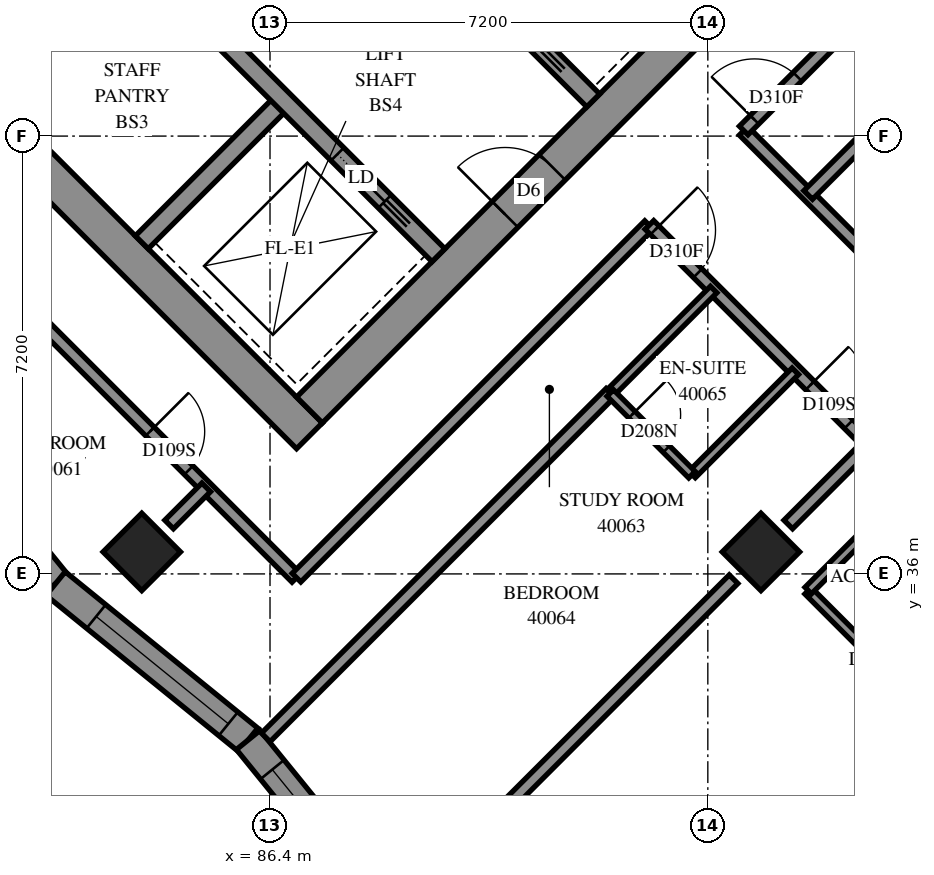
"""IFC4 building model, lengths in metres.
Left out: names, types, materials, properties, quantities, classifications, styles, units other than length and angle.
Written with IfcOpenShell. Run it as: python <this file> out.ifc"""

import sys

from ifc_helpers import new_model, si_unit, direction, frame, frame_2d, origin, origin_2d, place, context, subcontext, project, spatial, polyline, rectangle, outline, extrude, element, fill, save


model = new_model("IFC4")
c1 = context("Model", 3, precision=1e-05, world=origin(), true_north=direction((0.0, 1.0)))
c2 = subcontext(c1, "Body", "Model", "MODEL_VIEW")
j1 = project(units=[si_unit("LENGTHUNIT", "METRE"), si_unit("PLANEANGLEUNIT", "RADIAN")], contexts=[c1])
p1 = place(None, origin())
s1 = spatial("IfcSite", under=j1, at=p1, CompositionType="ELEMENT")
p2 = place(p1, origin())
s2 = spatial("IfcBuilding", under=s1, at=p2, CompositionType="ELEMENT")
p3 = place(p2, frame((0.0, 0.0, 149.0)))
s3 = spatial("IfcBuildingStorey", under=s2, at=p3, CompositionType="ELEMENT", Elevation=149.0)
for number, where, z_axis, x_axis in (
    (1, (84.291, 36.362, 0.0), (0.0, 0.0, 1.0), (0.707, -0.707, 0.0)),
    (2, (94.474, 36.362, 0.0), (0.0, 0.0, 1.0), (0.707, -0.707, 0.0)),
):
    element("IfcColumn", number, at=place(p3, frame(where, z_axis=z_axis, x_axis=x_axis)), inside=s3, PredefinedType="COLUMN", context=c2, shape_type="SweptSolid", body=[
        extrude(rectangle(XDim=0.9, YDim=0.9, at=origin_2d()), origin(), (0.0, 0.0, 1.0), 3.1),
    ])
p4 = place(p3, frame((76.018, 49.302, -0.3), z_axis=(0.0, 0.0, 1.0), x_axis=(0.7071067812, -0.7071067812, 0.0)))
e3 = element("IfcWall", 3, at=p4, inside=s3, PredefinedType="SHEAR", context=c2, shape_type="SweptSolid", body=[
    extrude(rectangle(XDim=15.6, YDim=0.6, at=frame_2d((7.8, 0.0))), origin(), (0.0, 0.0, 1.0), 2.7),
])
p5 = place(p3, frame((87.049, 38.695, -0.3), z_axis=(0.0, 0.0, 1.0), x_axis=(0.7071067812, 0.7071067812, 0.0)))
e4 = element("IfcWall", 4, at=p5, inside=s3, PredefinedType="SHEAR", context=c2, shape_type="SweptSolid", body=[
    extrude(rectangle(XDim=14.4, YDim=0.6, at=frame_2d((7.2, 0.0))), origin(), (0.0, 0.0, 1.0), 2.7),
])
p6 = place(p5, frame((4.55, 0.0, 0.3)))
e5 = element("IfcOpeningElement", 5, at=p6, cuts=e4, PredefinedType="OPENING", context=c2, shape_type="SweptSolid", body=[
    extrude(rectangle(XDim=1.1, YDim=2.1, at=frame_2d((0.55, 1.05))), frame((0.0, 0.31, 0.0), z_axis=(0.0, -1.0, 0.0), x_axis=(1.0, 0.0, 0.0)), (0.0, 0.0, 1.0), 0.62),
])
p7 = place(p5, frame((11.35, 0.0, 0.3)))
e6 = element("IfcOpeningElement", 6, at=p7, cuts=e4, PredefinedType="OPENING", context=c2, shape_type="SweptSolid", body=[
    extrude(rectangle(XDim=1.1, YDim=2.1, at=frame_2d((0.55, 1.05))), frame((0.0, 0.31, 0.0), z_axis=(0.0, -1.0, 0.0), x_axis=(1.0, 0.0, 0.0)), (0.0, 0.0, 1.0), 0.62),
])
for number, where, z_axis, x_axis in (
    (7, (81.746, 43.999, 0.0), (0.0, 0.0, 1.0), (0.707, 0.707, 0.0)),
    (8, (84.291, 41.453, 0.0), (0.0, 0.0, 1.0), (0.707, 0.707, 0.0)),
):
    element("IfcWall", number, at=place(p3, frame(where, z_axis=z_axis, x_axis=x_axis)), inside=s3, PredefinedType="SOLIDWALL", context=c2, shape_type="SweptSolid", body=[
        extrude(rectangle(XDim=3.3, YDim=0.3, at=frame_2d((1.65, 0.0))), origin(), (0.0, 0.0, 1.0), 3.1),
    ])
p8 = place(p3, frame((78.988, 51.423, 0.0), z_axis=(0.0, 0.0, 1.0), x_axis=(0.7071067812, -0.7071067812, 0.0)))
e9 = element("IfcWall", 9, at=p8, inside=s3, PredefinedType="SOLIDWALL", context=c2, shape_type="SweptSolid", body=[
    extrude(rectangle(XDim=14.4, YDim=0.3, at=frame_2d((7.2, 0.0))), origin(), (0.0, 0.0, 1.0), 3.1),
])
p9 = place(p8, frame((1.35, 0.0, 0.0)))
e10 = element("IfcOpeningElement", 10, at=p9, cuts=e9, PredefinedType="OPENING", context=c2, shape_type="SweptSolid", body=[
    extrude(rectangle(XDim=0.9, YDim=2.1, at=frame_2d((0.45, 1.05))), frame((0.0, 0.16, 0.0), z_axis=(0.0, -1.0, 0.0), x_axis=(1.0, 0.0, 0.0)), (0.0, 0.0, 1.0), 0.32),
])
p10 = place(p8, frame((4.95, 0.0, 0.0)))
e11 = element("IfcOpeningElement", 11, at=p10, cuts=e9, PredefinedType="OPENING", context=c2, shape_type="SweptSolid", body=[
    extrude(rectangle(XDim=0.9, YDim=2.1, at=frame_2d((0.45, 1.05))), frame((0.0, 0.16, 0.0), z_axis=(0.0, -1.0, 0.0), x_axis=(1.0, 0.0, 0.0)), (0.0, 0.0, 1.0), 0.32),
])
p11 = place(p8, frame((8.55, 0.0, 0.0)))
e12 = element("IfcOpeningElement", 12, at=p11, cuts=e9, PredefinedType="OPENING", context=c2, shape_type="SweptSolid", body=[
    extrude(rectangle(XDim=0.9, YDim=2.1, at=frame_2d((0.45, 1.05))), frame((0.0, 0.16, 0.0), z_axis=(0.0, -1.0, 0.0), x_axis=(1.0, 0.0, 0.0)), (0.0, 0.0, 1.0), 0.32),
])
p12 = place(p8, frame((12.05, 0.0, 0.0)))
e13 = element("IfcOpeningElement", 13, at=p12, cuts=e9, PredefinedType="OPENING", context=c2, shape_type="SweptSolid", body=[
    extrude(rectangle(XDim=1.1, YDim=2.1, at=frame_2d((0.55, 1.05))), frame((0.0, 0.16, 0.0), z_axis=(0.0, -1.0, 0.0), x_axis=(1.0, 0.0, 0.0)), (0.0, 0.0, 1.0), 0.32),
])
p13 = place(p3, frame((81.534, 53.969, 0.0), z_axis=(0.0, 0.0, 1.0), x_axis=(0.707103309, -0.7071102534, 0.0)))
e14 = element("IfcWall", 14, at=p13, inside=s3, PredefinedType="SOLIDWALL", context=c2, shape_type="SweptSolid", body=[
    extrude(rectangle(XDim=14.4, YDim=0.3, at=frame_2d((7.2, 0.0))), origin(), (0.0, 0.0, 1.0), 3.1),
])
p14 = place(p13, frame((1.25, 0.0, 0.0)))
e15 = element("IfcOpeningElement", 15, at=p14, cuts=e14, PredefinedType="OPENING", context=c2, shape_type="SweptSolid", body=[
    extrude(rectangle(XDim=1.1, YDim=2.1, at=frame_2d((0.55, 1.05))), frame((0.0, 0.16, 0.0), z_axis=(0.0, -1.0, 0.0), x_axis=(1.0, 0.0, 0.0)), (0.0, 0.0, 1.0), 0.32),
])
p15 = place(p13, frame((4.85, 0.0, 0.0)))
e16 = element("IfcOpeningElement", 16, at=p15, cuts=e14, PredefinedType="OPENING", context=c2, shape_type="SweptSolid", body=[
    extrude(rectangle(XDim=1.1, YDim=2.1, at=frame_2d((0.55, 1.05))), frame((0.0, 0.16, 0.0), z_axis=(0.0, -1.0, 0.0), x_axis=(1.0, 0.0, 0.0)), (0.0, 0.0, 1.0), 0.32),
])
p16 = place(p13, frame((8.45, 0.0, 0.0)))
e17 = element("IfcOpeningElement", 17, at=p16, cuts=e14, PredefinedType="OPENING", context=c2, shape_type="SweptSolid", body=[
    extrude(rectangle(XDim=1.1, YDim=2.1, at=frame_2d((0.55, 1.05))), frame((0.0, 0.16, 0.0), z_axis=(0.0, -1.0, 0.0), x_axis=(1.0, 0.0, 0.0)), (0.0, 0.0, 1.0), 0.32),
])
p17 = place(p13, frame((12.05, 0.0, 0.0)))
e18 = element("IfcOpeningElement", 18, at=p17, cuts=e14, PredefinedType="OPENING", context=c2, shape_type="SweptSolid", body=[
    extrude(rectangle(XDim=1.1, YDim=2.1, at=frame_2d((0.55, 1.05))), frame((0.0, 0.16, 0.0), z_axis=(0.0, -1.0, 0.0), x_axis=(1.0, 0.0, 0.0)), (0.0, 0.0, 1.0), 0.32),
])
p18 = place(p3, frame((80.291, 39.023, 0.0), z_axis=(0.0, 0.0, 1.0), x_axis=(0.6303794952, -0.7762871195, 0.0)))
e19 = element("IfcWall", 19, at=p18, inside=s3, PredefinedType="SOLIDWALL", context=c2, shape_type="SweptSolid", body=[
    extrude(outline(polyline([(0.044, -0.25), (4.124, -0.25), (4.072, 0.25), (-0.044, 0.25), (0.044, -0.25)])), origin(), (0.0, 0.0, 1.0), 3.1),
])
p19 = place(p18, frame((1.894, 0.0, 0.45)))
e20 = element("IfcOpeningElement", 20, at=p19, cuts=e19, PredefinedType="OPENING", context=c2, shape_type="SweptSolid", body=[
    extrude(rectangle(XDim=1.2, YDim=2.5, at=frame_2d((0.6, 1.25))), frame((0.0, 0.26, 0.0), z_axis=(0.0, -1.0, 0.0), x_axis=(1.0, 0.0, 0.0)), (0.0, 0.0, 1.0), 0.52),
])
p20 = place(p3, frame((82.874, 35.842, 0.0), z_axis=(0.0, 0.0, 1.0), x_axis=(0.7762833982, -0.6303840779, 0.0)))
e21 = element("IfcWall", 21, at=p20, inside=s3, PredefinedType="SOLIDWALL", context=c2, shape_type="SweptSolid", body=[
    extrude(outline(polyline([(-0.026, -0.25), (4.054, -0.25), (4.106, 0.25), (0.026, 0.25), (-0.026, -0.25)])), origin(), (0.0, 0.0, 1.0), 3.1),
])
p21 = place(p20, frame((0.859, 0.0, 0.45)))
e22 = element("IfcOpeningElement", 22, at=p21, cuts=e21, PredefinedType="OPENING", context=c2, shape_type="SweptSolid", body=[
    extrude(rectangle(XDim=2.8, YDim=2.5, at=frame_2d((1.4, 1.25))), frame((0.0, 0.26, 0.0), z_axis=(0.0, -1.0, 0.0), x_axis=(1.0, 0.0, 0.0)), (0.0, 0.0, 1.0), 0.52),
])
p22 = place(p3, frame((86.042, 33.269, 0.0), z_axis=(0.0, 0.0, 1.0), x_axis=(0.6303840779, -0.7762833982, 0.0)))
e23 = element("IfcWall", 23, at=p22, inside=s3, PredefinedType="SOLIDWALL", context=c2, shape_type="SweptSolid", body=[
    extrude(outline(polyline([(0.026, -0.25), (4.106, -0.25), (4.054, 0.25), (-0.026, 0.25), (0.026, -0.25)])), origin(), (0.0, 0.0, 1.0), 3.1),
])
p23 = place(p22, frame((0.627, 0.0, 0.45)))
e24 = element("IfcOpeningElement", 24, at=p23, cuts=e23, PredefinedType="OPENING", context=c2, shape_type="SweptSolid", body=[
    extrude(rectangle(XDim=2.8, YDim=2.5, at=frame_2d((1.4, 1.25))), frame((0.0, 0.26, 0.0), z_axis=(0.0, -1.0, 0.0), x_axis=(1.0, 0.0, 0.0)), (0.0, 0.0, 1.0), 0.52),
])
p24 = place(p3, frame((94.189, 43.287, 0.0), z_axis=(0.0, 0.0, 1.0), x_axis=(0.7071067812, -0.7071067812, 0.0)))
e25 = element("IfcWall", 25, at=p24, inside=s3, PredefinedType="PARTITIONING", context=c2, shape_type="SweptSolid", body=[
    extrude(rectangle(XDim=12.298, YDim=0.2, at=frame_2d((6.149, 0.0))), origin(), (0.0, 0.0, 1.0), 3.1),
])
p25 = place(p24, frame((3.755, 0.0, 0.0)))
e26 = element("IfcOpeningElement", 26, at=p25, cuts=e25, PredefinedType="OPENING", context=c2, shape_type="SweptSolid", body=[
    extrude(rectangle(XDim=0.9, YDim=2.1, at=frame_2d((0.45, 1.05))), frame((0.0, 0.11, 0.0), z_axis=(0.0, -1.0, 0.0), x_axis=(1.0, 0.0, 0.0)), (0.0, 0.0, 1.0), 0.22),
])
p26 = place(p24, frame((10.998, 0.0, 0.0)))
e27 = element("IfcOpeningElement", 27, at=p26, cuts=e25, PredefinedType="OPENING", context=c2, shape_type="SweptSolid", body=[
    extrude(rectangle(XDim=0.9, YDim=2.1, at=frame_2d((0.45, 1.05))), frame((0.0, 0.11, 0.0), z_axis=(0.0, -1.0, 0.0), x_axis=(1.0, 0.0, 0.0)), (0.0, 0.0, 1.0), 0.22),
])
p27 = place(p3, frame((95.25, 42.232, 0.0), z_axis=(0.0, 0.0, 1.0), x_axis=(0.7071114274, 0.7071021349, 0.0)))
e28 = element("IfcWall", 28, at=p27, inside=s3, PredefinedType="PARTITIONING", context=c2, shape_type="SweptSolid", body=[
    extrude(rectangle(XDim=10.761, YDim=0.2, at=frame_2d((5.381, 0.0))), origin(), (0.0, 0.0, 1.0), 3.1),
])
p28 = place(p3, frame((80.899, 41.869, 0.0), z_axis=(0.0, 0.0, 1.0), x_axis=(0.7071067812, -0.7071067812, 0.0)))
e29 = element("IfcWall", 29, at=p28, inside=s3, PredefinedType="PARTITIONING", context=c2, shape_type="SweptSolid", body=[
    extrude(rectangle(XDim=8.392, YDim=0.2, at=frame_2d((4.196, 0.0))), origin(), (0.0, 0.0, 1.0), 3.1),
])
p29 = place(p28, frame((4.988, 0.0, 0.0)))
e30 = element("IfcOpeningElement", 30, at=p29, cuts=e29, PredefinedType="OPENING", context=c2, shape_type="SweptSolid", body=[
    extrude(rectangle(XDim=0.9, YDim=2.1, at=frame_2d((0.45, 1.05))), frame((0.0, 0.11, 0.0), z_axis=(0.0, -1.0, 0.0), x_axis=(1.0, 0.0, 0.0)), (0.0, 0.0, 1.0), 0.22),
])
p30 = place(p3, frame((94.19, 43.292, 0.0), z_axis=(0.0, 0.0, 1.0), x_axis=(0.7071067812, 0.7071067812, 0.0)))
e31 = element("IfcWall", 31, at=p30, inside=s3, PredefinedType="PARTITIONING", context=c2, shape_type="SweptSolid", body=[
    extrude(rectangle(XDim=8.2, YDim=0.2, at=frame_2d((4.1, 0.0))), origin(), (0.0, 0.0, 1.0), 3.1),
])
p31 = place(p30, frame((0.251, 0.0, 0.0)))
e32 = element("IfcOpeningElement", 32, at=p31, cuts=e31, PredefinedType="OPENING", context=c2, shape_type="SweptSolid", body=[
    extrude(rectangle(XDim=1.0, YDim=2.1, at=frame_2d((0.5, 1.05))), frame((0.0, 0.11, 0.0), z_axis=(0.0, -1.0, 0.0), x_axis=(1.0, 0.0, 0.0)), (0.0, 0.0, 1.0), 0.22),
])
p32 = place(p3, frame((86.836, 35.938, 0.0), z_axis=(0.0, 0.0, 1.0), x_axis=(0.7071067812, 0.7071067812, 0.0)))
e33 = element("IfcWall", 33, at=p32, inside=s3, PredefinedType="PARTITIONING", context=c2, shape_type="SweptSolid", body=[
    extrude(rectangle(XDim=8.2, YDim=0.2, at=frame_2d((4.1, 0.0))), origin(), (0.0, 0.0, 1.0), 3.1),
])
p33 = place(p3, frame((86.33, 33.311, 0.0), z_axis=(0.0, 0.0, 1.0), x_axis=(0.7071005427, 0.7071130196, 0.0)))
e34 = element("IfcWall", 34, at=p33, inside=s3, PredefinedType="PARTITIONING", context=c2, shape_type="SweptSolid", body=[
    extrude(rectangle(XDim=8.015, YDim=0.2, at=frame_2d((4.007, 0.0))), origin(), (0.0, 0.0, 1.0), 3.1),
])
p34 = place(p3, frame((89.831, 31.721, 0.0), z_axis=(0.0, 0.0, 1.0), x_axis=(0.7071067812, 0.7071067812, 0.0)))
e35 = element("IfcWall", 35, at=p34, inside=s3, PredefinedType="PARTITIONING", context=c2, shape_type="SweptSolid", body=[
    extrude(rectangle(XDim=5.928, YDim=0.2, at=frame_2d((2.964, 0.0))), origin(), (0.0, 0.0, 1.0), 3.1),
])
p35 = place(p3, frame((92.639, 41.739, 0.0), z_axis=(0.0, 0.0, 1.0), x_axis=(0.7071067812, -0.7071067812, 0.0)))
e36 = element("IfcWall", 36, at=p35, inside=s3, PredefinedType="PARTITIONING", context=c2, shape_type="SweptSolid", body=[
    extrude(rectangle(XDim=5.1, YDim=0.2, at=frame_2d((2.55, 0.0))), origin(), (0.0, 0.0, 1.0), 3.1),
])
p36 = place(p35, frame((0.123, 0.0, 0.0)))
e37 = element("IfcOpeningElement", 37, at=p36, cuts=e36, PredefinedType="OPENING", context=c2, shape_type="SweptSolid", body=[
    extrude(rectangle(XDim=1.0, YDim=2.1, at=frame_2d((0.5, 1.05))), frame((0.0, 0.11, 0.0), z_axis=(0.0, -1.0, 0.0), x_axis=(1.0, 0.0, 0.0)), (0.0, 0.0, 1.0), 0.22),
])
p37 = place(p35, frame((3.734, 0.0, 0.0)))
e38 = element("IfcOpeningElement", 38, at=p37, cuts=e36, PredefinedType="OPENING", context=c2, shape_type="SweptSolid", body=[
    extrude(rectangle(XDim=0.9, YDim=2.1, at=frame_2d((0.45, 1.05))), frame((0.0, 0.11, 0.0), z_axis=(0.0, -1.0, 0.0), x_axis=(1.0, 0.0, 0.0)), (0.0, 0.0, 1.0), 0.22),
])
p38 = place(p3, frame((95.249, 35.723, 0.0), z_axis=(0.0, 0.0, 1.0), x_axis=(0.7067942478, -0.7074191764, 0.0)))
e39 = element("IfcWall", 39, at=p38, inside=s3, PredefinedType="PARTITIONING", context=c2, shape_type="SweptSolid", body=[
    extrude(rectangle(XDim=3.2, YDim=0.15, at=frame_2d((1.6, 0.0))), origin(), (0.0, 0.0, 1.0), 3.1),
])
p39 = place(p38, frame((1.206, 0.0, 0.0)))
e40 = element("IfcOpeningElement", 40, at=p39, cuts=e39, PredefinedType="OPENING", context=c2, shape_type="SweptSolid", body=[
    extrude(rectangle(XDim=0.8, YDim=2.1, at=frame_2d((0.4, 1.05))), frame((0.0, 0.085, 0.0), z_axis=(0.0, -1.0, 0.0), x_axis=(1.0, 0.0, 0.0)), (0.0, 0.0, 1.0), 0.17),
])
for number, where, z_axis, x_axis in (
    (41, (93.341, 37.635, 0.0), (0.0, 0.0, 1.0), (0.707, 0.707, 0.0)),
    (42, (91.997, 38.979, 0.0), (0.0, 0.0, 1.0), (0.707, 0.707, 0.0)),
):
    element("IfcWall", number, at=place(p3, frame(where, z_axis=z_axis, x_axis=x_axis)), inside=s3, PredefinedType="PARTITIONING", context=c2, shape_type="SweptSolid", body=[
        extrude(rectangle(XDim=2.401, YDim=0.15, at=frame_2d((1.201, 0.0))), origin(), (0.0, 0.0, 1.0), 3.1),
    ])
p40 = place(p3, frame((95.251, 35.727, 0.0), z_axis=(0.0, 0.0, 1.0), x_axis=(0.7071067812, 0.7071067812, 0.0)))
e43 = element("IfcWall", 43, at=p40, inside=s3, PredefinedType="PARTITIONING", context=c2, shape_type="SweptSolid", body=[
    extrude(rectangle(XDim=2.398, YDim=0.15, at=frame_2d((1.199, 0.0))), origin(), (0.0, 0.0, 1.0), 3.1),
])
p41 = place(p3, frame((91.995, 38.975, 0.0), z_axis=(0.0, 0.0, 1.0), x_axis=(0.7071067812, -0.7071067812, 0.0)))
e44 = element("IfcWall", 44, at=p41, inside=s3, PredefinedType="PARTITIONING", context=c2, shape_type="SweptSolid", body=[
    extrude(rectangle(XDim=1.901, YDim=0.15, at=frame_2d((0.95, 0.0))), origin(), (0.0, 0.0, 1.0), 3.1),
])
p42 = place(p41, frame((0.506, 0.0, 0.0)))
e45 = element("IfcOpeningElement", 45, at=p42, cuts=e44, PredefinedType="OPENING", context=c2, shape_type="SweptSolid", body=[
    extrude(rectangle(XDim=0.8, YDim=2.1, at=frame_2d((0.4, 1.05))), frame((0.0, 0.085, 0.0), z_axis=(0.0, -1.0, 0.0), x_axis=(1.0, 0.0, 0.0)), (0.0, 0.0, 1.0), 0.17),
])
p43 = place(p3, frame((94.923, 36.813, 0.0), z_axis=(0.0, 0.0, 1.0), x_axis=(0.7071067812, 0.7071067812, 0.0)))
e46 = element("IfcWall", 46, at=p43, inside=s3, PredefinedType="PARTITIONING", context=c2, shape_type="SweptSolid", body=[
    extrude(rectangle(XDim=1.864, YDim=0.2, at=frame_2d((0.932, 0.0))), origin(), (0.0, 0.0, 1.0), 3.1),
])
p44 = place(p3, frame((84.741, 36.813, 0.0), z_axis=(0.0, 0.0, 1.0), x_axis=(0.7071067812, 0.7071067812, 0.0)))
e47 = element("IfcWall", 47, at=p44, inside=s3, PredefinedType="PARTITIONING", context=c2, shape_type="SweptSolid", body=[
    extrude(rectangle(XDim=0.863, YDim=0.2, at=frame_2d((0.431, 0.0))), origin(), (0.0, 0.0, 1.0), 3.1),
])
p45 = place(p21, origin())
e48 = element("IfcWindow", 48, at=p45, inside=s3, PartitioningType="SINGLE_PANEL", PredefinedType="WINDOW", context=c2, shape_type="SweptSolid", body=[
    extrude(rectangle(XDim=2.8, YDim=2.5, at=frame_2d((1.4, 1.25))), frame((0.0, 0.18, 0.0), z_axis=(0.0, -1.0, 0.0), x_axis=(1.0, 0.0, 0.0)), (0.0, 0.0, 1.0), 0.06),
])
fill(e22, e48)
p46 = place(p23, origin())
e49 = element("IfcWindow", 49, at=p46, inside=s3, PartitioningType="SINGLE_PANEL", PredefinedType="WINDOW", context=c2, shape_type="SweptSolid", body=[
    extrude(rectangle(XDim=2.8, YDim=2.5, at=frame_2d((1.4, 1.25))), frame((0.0, 0.18, 0.0), z_axis=(0.0, -1.0, 0.0), x_axis=(1.0, 0.0, 0.0)), (0.0, 0.0, 1.0), 0.06),
])
fill(e24, e49)
p47 = place(p6, origin())
e50 = element("IfcDoor", 50, at=p47, inside=s3, OperationType="DOUBLE_DOOR_SINGLE_SWING", PredefinedType="DOOR", context=c2, shape_type="SweptSolid", body=[
    extrude(rectangle(XDim=1.1, YDim=2.1, at=frame_2d((0.55, 1.05))), frame((0.0, 0.025, 0.0), z_axis=(0.0, -1.0, 0.0), x_axis=(1.0, 0.0, 0.0)), (0.0, 0.0, 1.0), 0.05),
])
fill(e5, e50)
p48 = place(p12, origin())
e51 = element("IfcDoor", 51, at=p48, inside=s3, OperationType="SLIDING_TO_RIGHT", PredefinedType="DOOR", context=c2, shape_type="SweptSolid", body=[
    extrude(rectangle(XDim=1.1, YDim=2.1, at=frame_2d((0.55, 1.05))), frame((0.0, 0.025, 0.0), z_axis=(0.0, -1.0, 0.0), x_axis=(1.0, 0.0, 0.0)), (0.0, 0.0, 1.0), 0.05),
])
fill(e13, e51)
p49 = place(p31, origin())
e52 = element("IfcDoor", 52, at=p49, inside=s3, OperationType="SINGLE_SWING_RIGHT", PredefinedType="DOOR", context=c2, shape_type="SweptSolid", body=[
    extrude(rectangle(XDim=1.0, YDim=2.1, at=frame_2d((0.5, 1.05))), frame((0.0, 0.025, 0.0), z_axis=(0.0, -1.0, 0.0), x_axis=(1.0, 0.0, 0.0)), (0.0, 0.0, 1.0), 0.05),
])
fill(e32, e52)
p50 = place(p29, origin())
e53 = element("IfcDoor", 53, at=p50, inside=s3, OperationType="SINGLE_SWING_RIGHT", PredefinedType="DOOR", context=c2, shape_type="SweptSolid", body=[
    extrude(rectangle(XDim=0.9, YDim=2.1, at=frame_2d((0.45, 1.05))), frame((0.0, 0.025, 0.0), z_axis=(0.0, -1.0, 0.0), x_axis=(1.0, 0.0, 0.0)), (0.0, 0.0, 1.0), 0.05),
])
fill(e30, e53)
p51 = place(p36, origin())
e54 = element("IfcDoor", 54, at=p51, inside=s3, OperationType="SINGLE_SWING_RIGHT", PredefinedType="DOOR", context=c2, shape_type="SweptSolid", body=[
    extrude(rectangle(XDim=1.0, YDim=2.1, at=frame_2d((0.5, 1.05))), frame((0.0, 0.025, 0.0), z_axis=(0.0, -1.0, 0.0), x_axis=(1.0, 0.0, 0.0)), (0.0, 0.0, 1.0), 0.05),
])
fill(e37, e54)
p52 = place(p37, origin())
e55 = element("IfcDoor", 55, at=p52, inside=s3, OperationType="SINGLE_SWING_LEFT", PredefinedType="DOOR", context=c2, shape_type="SweptSolid", body=[
    extrude(rectangle(XDim=0.9, YDim=2.1, at=frame_2d((0.45, 1.05))), frame((0.0, 0.025, 0.0), z_axis=(0.0, -1.0, 0.0), x_axis=(1.0, 0.0, 0.0)), (0.0, 0.0, 1.0), 0.05),
])
fill(e38, e55)
p53 = place(p42, origin())
e56 = element("IfcDoor", 56, at=p53, inside=s3, OperationType="SINGLE_SWING_RIGHT", PredefinedType="DOOR", context=c2, shape_type="SweptSolid", body=[
    extrude(rectangle(XDim=0.8, YDim=2.1, at=frame_2d((0.4, 1.05))), frame((0.0, 0.025, 0.0), z_axis=(0.0, -1.0, 0.0), x_axis=(1.0, 0.0, 0.0)), (0.0, 0.0, 1.0), 0.05),
])
fill(e45, e56)
save(model, sys.argv[1])
